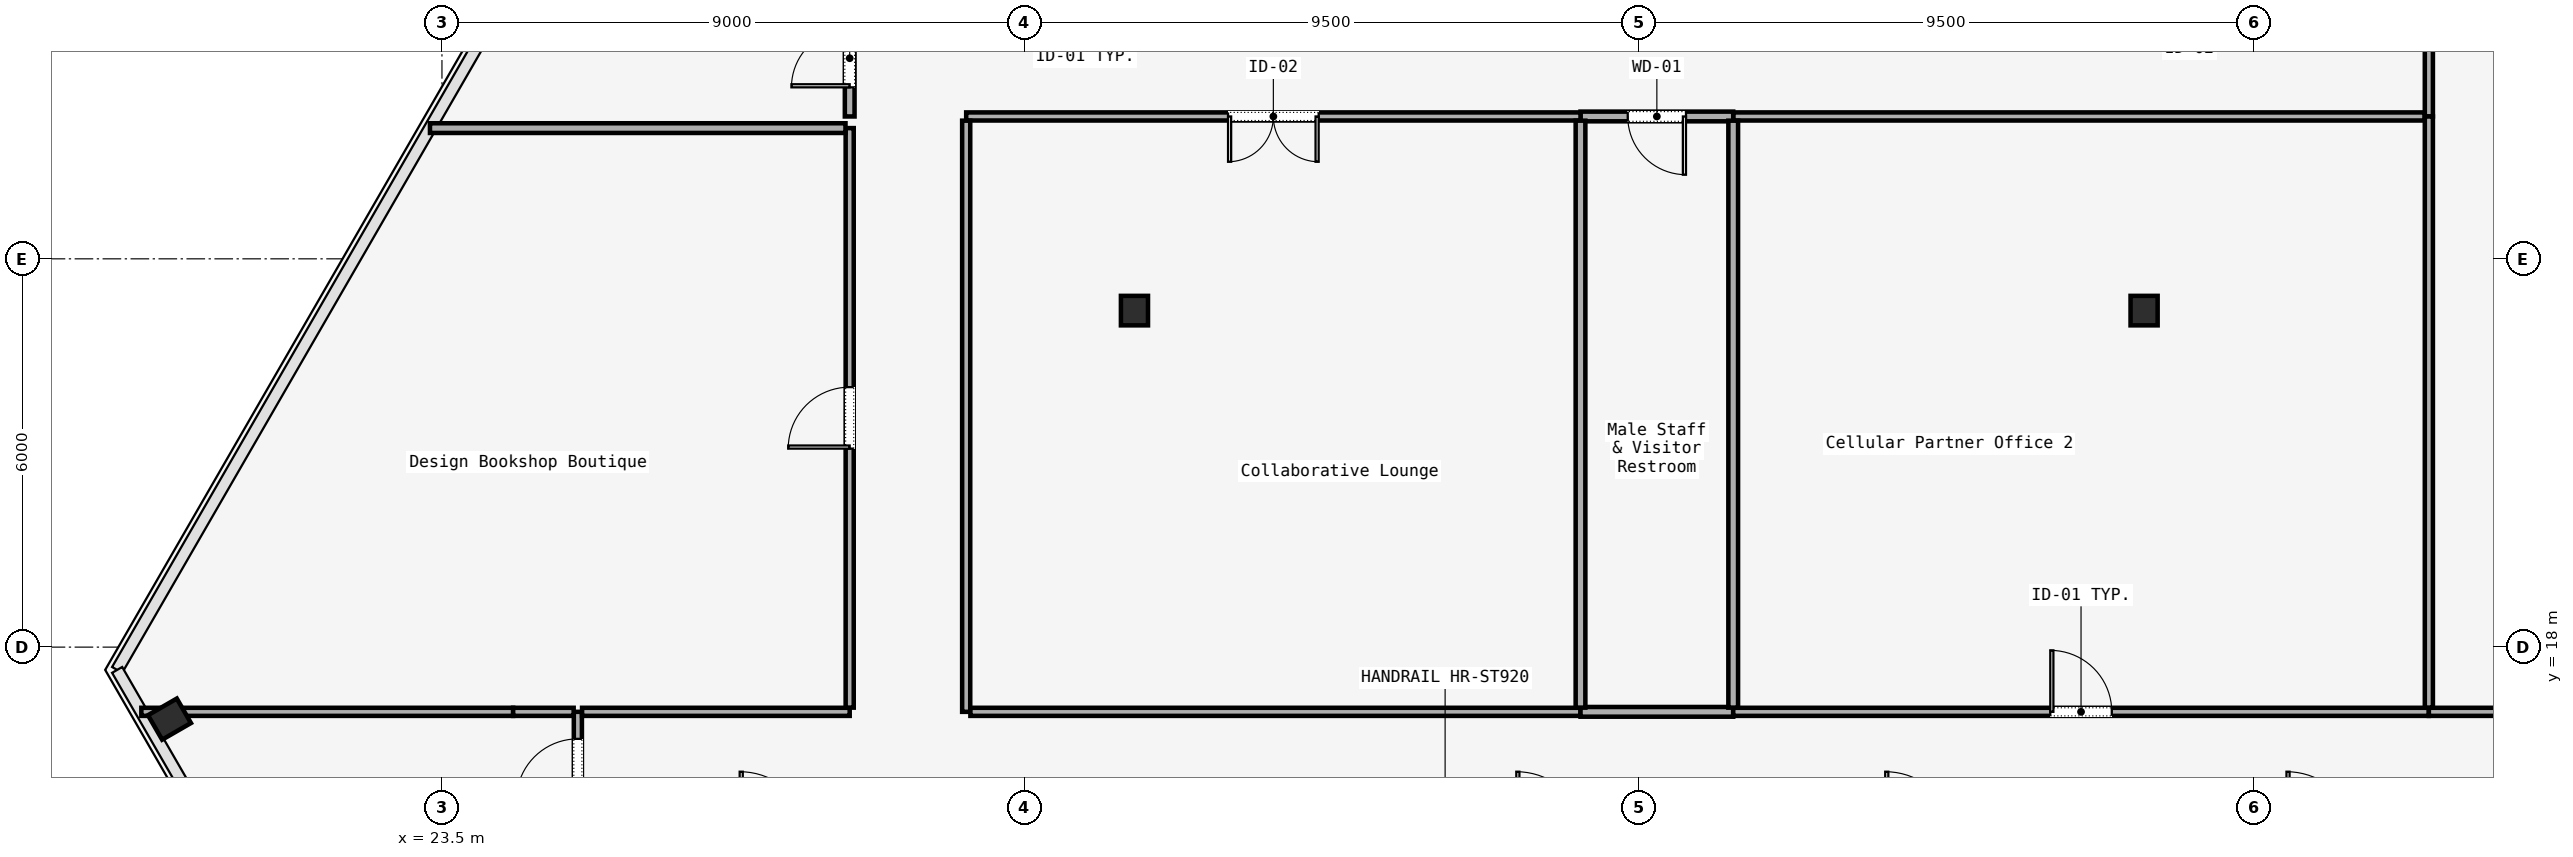
"""IFC4 building model, lengths in metres.
Left out: names, types, materials, properties, quantities, classifications, styles, units other than length and angle.
Written with IfcOpenShell. Run it as: python <this file> out.ifc"""

import sys

from ifc_helpers import new_model, si_unit, direction, frame, frame_2d, origin, origin_2d, place, context, subcontext, project, spatial, rectangle, i_section, extrude, element, fill, save


model = new_model("IFC4")
c1 = context("Model", 3, precision=1e-05, world=origin(), true_north=direction((0.0, 1.0)))
c2 = subcontext(c1, "Body", "Model", "MODEL_VIEW")
j1 = project(units=[si_unit("LENGTHUNIT", "METRE"), si_unit("PLANEANGLEUNIT", "RADIAN")], contexts=[c1])
p1 = place(None, origin())
s1 = spatial("IfcSite", under=j1, at=p1, CompositionType="ELEMENT")
p2 = place(p1, origin())
s2 = spatial("IfcBuilding", under=s1, at=p2, CompositionType="ELEMENT")
p3 = place(p2, frame((0.0, 0.0, 81.6)))
s3 = spatial("IfcBuildingStorey", under=s2, at=p3, CompositionType="ELEMENT", Elevation=81.6)
for number, where, z_axis, x_axis in (
    (1, (34.2, 23.2, 0.0), (0.0, 0.0, 1.0), (1.0, 0.0, 0.0)),
    (2, (49.8, 23.2, 0.0), (0.0, 0.0, 1.0), (1.0, 0.0, 0.0)),
):
    element("IfcColumn", number, at=place(p3, frame(where, z_axis=z_axis, x_axis=x_axis)), inside=s3, PredefinedType="COLUMN", context=c2, shape_type="SweptSolid", body=[
        extrude(i_section(OverallWidth=0.418, OverallDepth=0.456, WebThickness=0.042, FlangeThickness=0.067, FilletRadius=0.015, at=origin_2d()), origin(), (0.0, 0.0, 1.0), 3.58),
    ])
p4 = place(p3, frame((19.29, 16.887, 0.0), z_axis=(0.0, 0.0, 1.0), x_axis=(-0.5, 0.866025403784, 0.0)))
e3 = element("IfcColumn", 3, at=p4, inside=s3, PredefinedType="COLUMN", context=c2, shape_type="SweptSolid", body=[
    extrude(i_section(OverallWidth=0.437, OverallDepth=0.514, WebThickness=0.061, FlangeThickness=0.077, FilletRadius=0.015, at=origin_2d()), origin(), (0.0, 0.0, 1.0), 3.58),
])
p5 = place(p3, frame((25.6, 15.215, 0.0), z_axis=(0.0, 0.0, 1.0), x_axis=(0.0, 1.0, 0.0)))
e4 = element("IfcWall", 4, at=p5, inside=s3, PredefinedType="PARTITIONING", context=c2, shape_type="SweptSolid", body=[
    extrude(rectangle(XDim=1.785, YDim=0.125, at=frame_2d((0.893, 0.0))), origin(), (0.0, 0.0, 1.0), 2.95),
])
p6 = place(p5, frame((0.417, 0.0, 0.0)))
e5 = element("IfcOpeningElement", 5, at=p6, cuts=e4, PredefinedType="OPENING", context=c2, shape_type="SweptSolid", body=[
    extrude(rectangle(XDim=0.95, YDim=2.2, at=frame_2d((0.475, 1.1))), frame((0.0, 0.062, 0.0), z_axis=(0.0, -1.0, 0.0), x_axis=(1.0, 0.0, 0.0)), (0.0, 0.0, 1.0), 0.125),
])
p7 = place(p3, frame((25.665, 17.0, 0.0), z_axis=(0.0, 0.0, 1.0), x_axis=(1.0, 0.0, 0.0)))
e6 = element("IfcWall", 6, at=p7, inside=s3, PredefinedType="PARTITIONING", context=c2, shape_type="SweptSolid", body=[
    extrude(rectangle(XDim=4.135, YDim=0.125, at=frame_2d((2.067, 0.0))), origin(), (0.0, 0.0, 1.0), 2.95),
])
p8 = place(p3, frame((29.8, 17.065, 0.0), z_axis=(0.0, 0.0, 1.0), x_axis=(0.0, 1.0, 0.0)))
e7 = element("IfcWall", 7, at=p8, inside=s3, PredefinedType="PARTITIONING", context=c2, shape_type="SweptSolid", body=[
    extrude(rectangle(XDim=8.955, YDim=0.125, at=frame_2d((4.478, 0.0))), origin(), (0.0, 0.0, 1.0), 2.95),
])
p9 = place(p8, frame((4.002, 0.0, 0.0)))
e8 = element("IfcOpeningElement", 8, at=p9, cuts=e7, PredefinedType="OPENING", context=c2, shape_type="SweptSolid", body=[
    extrude(rectangle(XDim=0.95, YDim=2.2, at=frame_2d((0.475, 1.1))), frame((0.0, 0.062, 0.0), z_axis=(0.0, -1.0, 0.0), x_axis=(1.0, 0.0, 0.0)), (0.0, 0.0, 1.0), 0.125),
])
p10 = place(p3, frame((29.8, 26.2, 0.0), z_axis=(0.0, 0.0, 1.0), x_axis=(0.0, 1.0, 0.0)))
e9 = element("IfcWall", 9, at=p10, inside=s3, PredefinedType="PARTITIONING", context=c2, shape_type="SweptSolid", body=[
    extrude(rectangle(XDim=1.8, YDim=0.15, at=frame_2d((0.9, 0.0))), origin(), (0.0, 0.0, 1.0), 2.95),
])
p11 = place(p10, frame((0.45, 0.0, 0.0)))
e10 = element("IfcOpeningElement", 10, at=p11, cuts=e9, PredefinedType="OPENING", context=c2, shape_type="SweptSolid", body=[
    extrude(rectangle(XDim=0.9, YDim=2.15, at=frame_2d((0.45, 1.075))), frame((0.0, 0.075, 0.0), z_axis=(0.0, -1.0, 0.0), x_axis=(1.0, 0.0, 0.0)), (0.0, 0.0, 1.0), 0.15),
])
p12 = place(p3, frame((54.2, 27.935, 0.0), z_axis=(0.0, 0.0, 1.0), x_axis=(0.0, -1.0, 0.0)))
e11 = element("IfcWall", 11, at=p12, inside=s3, PredefinedType="PARTITIONING", context=c2, shape_type="SweptSolid", body=[
    extrude(rectangle(XDim=1.735, YDim=0.125, at=frame_2d((0.868, 0.0))), origin(), (0.0, 0.0, 1.0), 2.95),
])
p13 = place(p3, frame((54.135, 26.2, 0.0), z_axis=(0.0, 0.0, 1.0), x_axis=(-1.0, 0.0, 0.0)))
e12 = element("IfcWall", 12, at=p13, inside=s3, PredefinedType="PARTITIONING", context=c2, shape_type="SweptSolid", body=[
    extrude(rectangle(XDim=10.684, YDim=0.125, at=frame_2d((5.342, 0.0))), origin(), (0.0, 0.0, 1.0), 2.95),
])
p14 = place(p3, frame((43.451, 26.2, 0.0), z_axis=(0.0, 0.0, 1.0), x_axis=(-1.0, 0.0, 0.0)))
e13 = element("IfcWall", 13, at=p14, inside=s3, PredefinedType="PARTITIONING", context=c2, shape_type="SweptSolid", body=[
    extrude(rectangle(XDim=2.359, YDim=0.15, at=frame_2d((1.18, 0.0))), origin(), (0.0, 0.0, 1.0), 2.95),
])
p15 = place(p14, frame((0.73, 0.0, 0.0)))
e14 = element("IfcOpeningElement", 14, at=p15, cuts=e13, PredefinedType="OPENING", context=c2, shape_type="SweptSolid", body=[
    extrude(rectangle(XDim=0.9, YDim=2.15, at=frame_2d((0.45, 1.075))), frame((0.0, 0.075, 0.0), z_axis=(0.0, -1.0, 0.0), x_axis=(1.0, 0.0, 0.0)), (0.0, 0.0, 1.0), 0.15),
])
p16 = place(p3, frame((41.092, 26.2, 0.0), z_axis=(0.0, 0.0, 1.0), x_axis=(-1.0, 0.0, 0.0)))
e15 = element("IfcWall", 15, at=p16, inside=s3, PredefinedType="PARTITIONING", context=c2, shape_type="SweptSolid", body=[
    extrude(rectangle(XDim=9.492, YDim=0.125, at=frame_2d((4.746, 0.0))), origin(), (0.0, 0.0, 1.0), 2.95),
])
p17 = place(p16, frame((4.046, 0.0, 0.0)))
e16 = element("IfcOpeningElement", 16, at=p17, cuts=e15, PredefinedType="OPENING", context=c2, shape_type="SweptSolid", body=[
    extrude(rectangle(XDim=1.4, YDim=2.2, at=frame_2d((0.7, 1.1))), frame((0.0, 0.062, 0.0), z_axis=(0.0, -1.0, 0.0), x_axis=(1.0, 0.0, 0.0)), (0.0, 0.0, 1.0), 0.125),
])
p18 = place(p3, frame((31.6, 26.135, 0.0), z_axis=(0.0, 0.0, 1.0), x_axis=(0.0, -1.0, 0.0)))
e17 = element("IfcWall", 17, at=p18, inside=s3, PredefinedType="PARTITIONING", context=c2, shape_type="SweptSolid", body=[
    extrude(rectangle(XDim=9.135, YDim=0.125, at=frame_2d((4.567, 0.0))), origin(), (0.0, 0.0, 1.0), 2.95),
])
p19 = place(p3, frame((31.665, 17.0, 0.0), z_axis=(0.0, 0.0, 1.0), x_axis=(1.0, 0.0, 0.0)))
e18 = element("IfcWall", 18, at=p19, inside=s3, PredefinedType="PARTITIONING", context=c2, shape_type="SweptSolid", body=[
    extrude(rectangle(XDim=9.427, YDim=0.125, at=frame_2d((4.713, 0.0))), origin(), (0.0, 0.0, 1.0), 2.95),
])
p20 = place(p3, frame((41.092, 17.0, 0.0), z_axis=(0.0, 0.0, 1.0), x_axis=(1.0, 0.0, 0.0)))
e19 = element("IfcWall", 19, at=p20, inside=s3, PredefinedType="PARTITIONING", context=c2, shape_type="SweptSolid", body=[
    extrude(rectangle(XDim=2.359, YDim=0.15, at=frame_2d((1.18, 0.0))), origin(), (0.0, 0.0, 1.0), 2.95),
])
p21 = place(p3, frame((43.451, 17.0, 0.0), z_axis=(0.0, 0.0, 1.0), x_axis=(1.0, 0.0, 0.0)))
e20 = element("IfcWall", 20, at=p21, inside=s3, PredefinedType="PARTITIONING", context=c2, shape_type="SweptSolid", body=[
    extrude(rectangle(XDim=10.749, YDim=0.125, at=frame_2d((5.374, 0.0))), origin(), (0.0, 0.0, 1.0), 2.95),
])
p22 = place(p21, frame((4.899, 0.0, 0.0)))
e21 = element("IfcOpeningElement", 21, at=p22, cuts=e20, PredefinedType="OPENING", context=c2, shape_type="SweptSolid", body=[
    extrude(rectangle(XDim=0.95, YDim=2.2, at=frame_2d((0.475, 1.1))), frame((0.0, 0.062, 0.0), z_axis=(0.0, -1.0, 0.0), x_axis=(1.0, 0.0, 0.0)), (0.0, 0.0, 1.0), 0.125),
])
p23 = place(p3, frame((54.2, 17.0, 0.0), z_axis=(0.0, 0.0, 1.0), x_axis=(1.0, 0.0, 0.0)))
e22 = element("IfcWall", 22, at=p23, inside=s3, PredefinedType="PARTITIONING", context=c2, shape_type="SweptSolid", body=[
    extrude(rectangle(XDim=4.135, YDim=0.125, at=frame_2d((2.067, 0.0))), origin(), (0.0, 0.0, 1.0), 2.95),
])
p24 = place(p23, frame((1.593, 0.0, 0.0)))
e23 = element("IfcOpeningElement", 23, at=p24, cuts=e22, PredefinedType="OPENING", context=c2, shape_type="SweptSolid", body=[
    extrude(rectangle(XDim=0.95, YDim=2.2, at=frame_2d((0.475, 1.1))), frame((0.0, 0.062, 0.0), z_axis=(0.0, -1.0, 0.0), x_axis=(1.0, 0.0, 0.0)), (0.0, 0.0, 1.0), 0.125),
])
p25 = place(p3, frame((18.855, 17.0, 0.0), z_axis=(0.0, 0.0, 1.0), x_axis=(1.0, 0.0, 0.0)))
e24 = element("IfcWall", 24, at=p25, inside=s3, PredefinedType="PARTITIONING", context=c2, shape_type="SweptSolid", body=[
    extrude(rectangle(XDim=5.745, YDim=0.125, at=frame_2d((2.873, 0.0))), origin(), (0.0, 0.0, 1.0), 2.95),
])
p26 = place(p3, frame((24.6, 17.0, 0.0), z_axis=(0.0, 0.0, 1.0), x_axis=(1.0, 0.0, 0.0)))
e25 = element("IfcWall", 25, at=p26, inside=s3, PredefinedType="PARTITIONING", context=c2, shape_type="SweptSolid", body=[
    extrude(rectangle(XDim=0.935, YDim=0.125, at=frame_2d((0.467, 0.0))), origin(), (0.0, 0.0, 1.0), 2.95),
])
p27 = place(p3, frame((23.315, 26.02, 0.0), z_axis=(0.0, 0.0, 1.0), x_axis=(1.0, 0.0, 0.0)))
e26 = element("IfcWall", 26, at=p27, inside=s3, PredefinedType="PARTITIONING", context=c2, shape_type="SweptSolid", body=[
    extrude(rectangle(XDim=6.42, YDim=0.15, at=frame_2d((3.21, 0.0))), origin(), (0.0, 0.0, 1.0), 2.95),
])
for number, where, z_axis, x_axis in (
    (27, (41.092, 26.135, 0.0), (0.0, 0.0, 1.0), (0.0, -1.0, 0.0)),
    (28, (43.451, 26.135, 0.0), (0.0, 0.0, 1.0), (0.0, -1.0, 0.0)),
):
    element("IfcWall", number, at=place(p3, frame(where, z_axis=z_axis, x_axis=x_axis)), inside=s3, PredefinedType="PARTITIONING", context=c2, shape_type="SweptSolid", body=[
        extrude(rectangle(XDim=9.07, YDim=0.15, at=frame_2d((4.535, 0.0))), origin(), (0.0, 0.0, 1.0), 2.95),
    ])
p28 = place(p3, frame((54.2, 26.2, 0.0), z_axis=(0.0, 0.0, 1.0), x_axis=(0.0, -1.0, 0.0)))
e29 = element("IfcWall", 29, at=p28, inside=s3, PredefinedType="PARTITIONING", context=c2, shape_type="SweptSolid", body=[
    extrude(rectangle(XDim=9.135, YDim=0.125, at=frame_2d((4.567, 0.0))), origin(), (0.0, 0.0, 1.0), 2.95),
])
p29 = place(p6, origin())
e30 = element("IfcDoor", 30, at=p29, inside=s3, OperationType="SINGLE_SWING_LEFT", PredefinedType="DOOR", context=c2, shape_type="SweptSolid", body=[
    extrude(rectangle(XDim=0.95, YDim=2.2, at=frame_2d((0.475, 1.1))), frame((0.0, 0.025, 0.0), z_axis=(0.0, -1.0, 0.0), x_axis=(1.0, 0.0, 0.0)), (0.0, 0.0, 1.0), 0.05),
])
fill(e5, e30)
p30 = place(p9, origin())
e31 = element("IfcDoor", 31, at=p30, inside=s3, OperationType="SINGLE_SWING_LEFT", PredefinedType="DOOR", context=c2, shape_type="SweptSolid", body=[
    extrude(rectangle(XDim=0.95, YDim=2.2, at=frame_2d((0.475, 1.1))), frame((0.0, 0.025, 0.0), z_axis=(0.0, -1.0, 0.0), x_axis=(1.0, 0.0, 0.0)), (0.0, 0.0, 1.0), 0.05),
])
fill(e8, e31)
p31 = place(p17, origin())
e32 = element("IfcDoor", 32, at=p31, inside=s3, OperationType="SINGLE_SWING_RIGHT", PredefinedType="DOOR", context=c2, shape_type="SweptSolid", body=[
    extrude(rectangle(XDim=1.4, YDim=2.2, at=frame_2d((0.7, 1.1))), frame((0.0, 0.025, 0.0), z_axis=(0.0, -1.0, 0.0), x_axis=(1.0, 0.0, 0.0)), (0.0, 0.0, 1.0), 0.05),
])
fill(e16, e32)
p32 = place(p15, origin())
e33 = element("IfcDoor", 33, at=p32, inside=s3, OperationType="SINGLE_SWING_LEFT", PredefinedType="DOOR", context=c2, shape_type="SweptSolid", body=[
    extrude(rectangle(XDim=0.9, YDim=2.15, at=frame_2d((0.45, 1.075))), frame((0.0, 0.025, 0.0), z_axis=(0.0, -1.0, 0.0), x_axis=(1.0, 0.0, 0.0)), (0.0, 0.0, 1.0), 0.05),
])
fill(e14, e33)
p33 = place(p22, origin())
e34 = element("IfcDoor", 34, at=p33, inside=s3, OperationType="SINGLE_SWING_RIGHT", PredefinedType="DOOR", context=c2, shape_type="SweptSolid", body=[
    extrude(rectangle(XDim=0.95, YDim=2.2, at=frame_2d((0.475, 1.1))), frame((0.0, 0.025, 0.0), z_axis=(0.0, -1.0, 0.0), x_axis=(1.0, 0.0, 0.0)), (0.0, 0.0, 1.0), 0.05),
])
fill(e21, e34)
p34 = place(p11, origin())
e35 = element("IfcDoor", 35, at=p34, inside=s3, OperationType="SINGLE_SWING_RIGHT", PredefinedType="DOOR", context=c2, shape_type="SweptSolid", body=[
    extrude(rectangle(XDim=0.9, YDim=2.15, at=frame_2d((0.45, 1.075))), frame((0.0, 0.025, 0.0), z_axis=(0.0, -1.0, 0.0), x_axis=(1.0, 0.0, 0.0)), (0.0, 0.0, 1.0), 0.05),
])
fill(e10, e35)
save(model, sys.argv[1])
